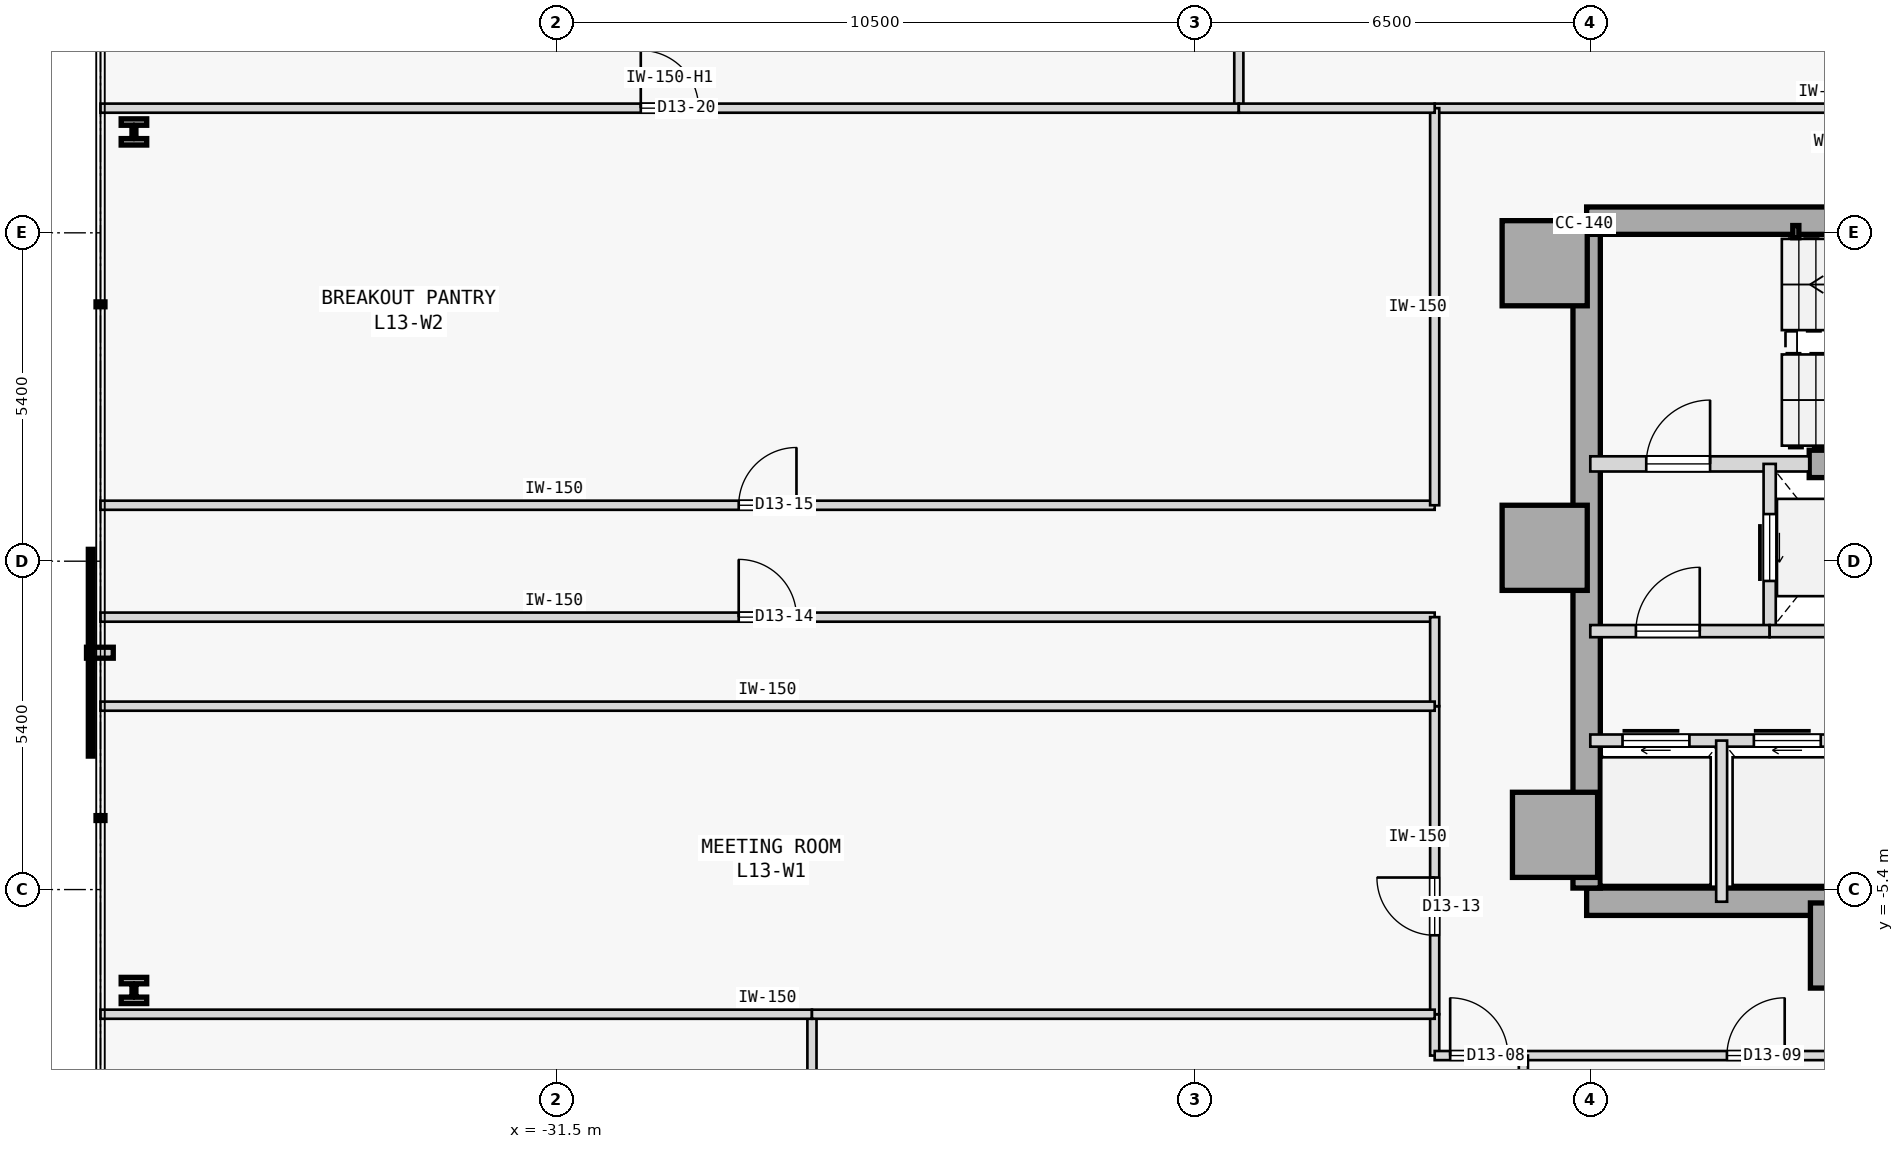
"""IFC4 building model, lengths in metres.
Left out: names, types, materials, properties, quantities, classifications, styles, units other than length and angle.
Written with IfcOpenShell. Run it as: python <this file> out.ifc"""

import sys

from ifc_helpers import new_model, si_unit, direction, frame, frame_2d, origin, origin_2d, place, context, subcontext, project, spatial, rectangle, hollow_rectangle, i_section, extrude, element, fill, save


model = new_model("IFC4")
c1 = context("Model", 3, precision=1e-05, world=origin(), true_north=direction((0.0, 1.0)))
c2 = subcontext(c1, "Body", "Model", "MODEL_VIEW")
j1 = project(units=[si_unit("LENGTHUNIT", "METRE"), si_unit("PLANEANGLEUNIT", "RADIAN")], contexts=[c1])
p1 = place(None, origin())
s1 = spatial("IfcSite", under=j1, at=p1, CompositionType="ELEMENT")
p2 = place(p1, origin())
s2 = spatial("IfcBuilding", under=s1, at=p2, CompositionType="ELEMENT")
p3 = place(p2, frame((0.0, 0.0, 56.0)))
s3 = spatial("IfcBuildingStorey", under=s2, at=p3, CompositionType="ELEMENT", Elevation=56.0)
for number, where, z_axis, x_axis in (
    (1, (-15.25, 4.9, 0.0), (0.0, 0.0, 1.0), (1.0, 0.0, 0.0)),
    (2, (-15.25, 0.22, 0.0), (0.0, 0.0, 1.0), (1.0, 0.0, 0.0)),
    (3, (-15.08, -4.5, 0.0), (0.0, 0.0, 1.0), (1.0, 0.0, 0.0)),
    (4, (-10.18, -6.32, 0.0), (0.0, 0.0, 1.0), (1.0, 0.0, 0.0)),
):
    element("IfcColumn", number, at=place(p3, frame(where, z_axis=z_axis, x_axis=x_axis)), inside=s3, PredefinedType="COLUMN", context=c2, shape_type="SweptSolid", body=[
        extrude(rectangle(XDim=1.4, YDim=1.4, at=origin_2d()), origin(), (0.0, 0.0, 1.0), 3.8),
    ])
p4 = place(p3, frame((-14.56, 5.6, 0.0), z_axis=(0.0, 0.0, 1.0), x_axis=(1.0, 0.0, 0.0)))
e5 = element("IfcWall", 5, at=p4, inside=s3, PredefinedType="SHEAR", context=c2, shape_type="SweptSolid", body=[
    extrude(rectangle(XDim=11.41, YDim=0.45, at=frame_2d((5.705, 0.0))), origin(), (0.0, 0.0, 1.0), 3.575),
])
p5 = place(p3, frame((-14.56, -5.6, 0.0), z_axis=(0.0, 0.0, 1.0), x_axis=(1.0, 0.0, 0.0)))
e6 = element("IfcWall", 6, at=p5, inside=s3, PredefinedType="SHEAR", context=c2, shape_type="SweptSolid", body=[
    extrude(rectangle(XDim=10.86, YDim=0.45, at=frame_2d((5.43, 0.0))), origin(), (0.0, 0.0, 1.0), 3.575),
])
p6 = place(p3, frame((-14.56, -5.375, 0.0), z_axis=(0.0, 0.0, 1.0), x_axis=(0.0, 1.0, 0.0)))
e7 = element("IfcWall", 7, at=p6, inside=s3, PredefinedType="SHEAR", context=c2, shape_type="SweptSolid", body=[
    extrude(rectangle(XDim=10.75, YDim=0.45, at=frame_2d((5.375, 0.0))), origin(), (0.0, 0.0, 1.0), 3.575),
])
p7 = place(p3, frame((-10.9, 1.6, 0.0), z_axis=(0.0, 0.0, 1.0), x_axis=(1.0, 0.0, 0.0)))
e8 = element("IfcWall", 8, at=p7, inside=s3, PredefinedType="SHEAR", context=c2, shape_type="SweptSolid", body=[
    extrude(rectangle(XDim=5.15, YDim=0.45, at=frame_2d((2.575, 0.0))), origin(), (0.0, 0.0, 1.0), 3.575),
])
p8 = place(p3, frame((-11.12, 5.42, 0.0), z_axis=(0.0, 0.0, 1.0), x_axis=(1.0, 0.0, 0.0)))
e9 = element("IfcColumn", 9, at=p8, inside=s3, PredefinedType="COLUMN", context=c2, shape_type="SweptSolid", body=[
    extrude(hollow_rectangle(XDim=0.1, YDim=0.2, WallThickness=0.008, at=origin_2d()), origin(), (0.0, 0.0, 1.0), 3.8),
])
for number, where, z_axis, x_axis in (
    (10, (-38.45, 7.059, 0.0), (0.0, 0.0, 1.0), (1.0, 0.0, 0.0)),
    (11, (-38.45, -7.059, 0.0), (0.0, 0.0, 1.0), (1.0, 0.0, 0.0)),
):
    element("IfcColumn", number, at=place(p3, frame(where, z_axis=z_axis, x_axis=x_axis)), inside=s3, PredefinedType="COLUMN", context=c2, shape_type="SweptSolid", body=[
        extrude(i_section(OverallWidth=0.42, OverallDepth=0.431, WebThickness=0.065, FlangeThickness=0.106, FilletRadius=0.015, at=origin_2d()), origin(), (0.0, 0.0, 1.0), 3.8),
    ])
p9 = place(p3, frame((-14.5, 1.6, 0.0), z_axis=(0.0, 0.0, 1.0), x_axis=(1.0, 0.0, 0.0)))
e12 = element("IfcWall", 12, at=p9, inside=s3, PredefinedType="STANDARD", context=c2, shape_type="SweptSolid", body=[
    extrude(rectangle(XDim=3.6, YDim=0.25, at=frame_2d((1.8, 0.0))), origin(), (0.0, 0.0, 1.0), 3.575),
])
p10 = place(p9, frame((0.92, 0.0, 0.0)))
e13 = element("IfcOpeningElement", 13, at=p10, cuts=e12, PredefinedType="OPENING", context=c2, shape_type="SweptSolid", body=[
    extrude(rectangle(XDim=1.05, YDim=2.15, at=frame_2d((0.525, 1.075))), frame((0.0, 0.135, 0.0), z_axis=(0.0, -1.0, 0.0), x_axis=(1.0, 0.0, 0.0)), (0.0, 0.0, 1.0), 0.27),
])
p11 = place(p3, frame((-11.55, -1.15, 0.0), z_axis=(0.0, 0.0, 1.0), x_axis=(0.0, 1.0, 0.0)))
e14 = element("IfcWall", 14, at=p11, inside=s3, PredefinedType="STANDARD", context=c2, shape_type="SweptSolid", body=[
    extrude(rectangle(XDim=2.75, YDim=0.2, at=frame_2d((1.375, 0.0))), origin(), (0.0, 0.0, 1.0), 3.575),
])
p12 = place(p11, frame((0.825, 0.0, 0.0)))
e15 = element("IfcOpeningElement", 15, at=p12, cuts=e14, PredefinedType="OPENING", context=c2, shape_type="SweptSolid", body=[
    extrude(rectangle(XDim=1.1, YDim=2.15, at=frame_2d((0.55, 1.075))), frame((0.0, 0.11, 0.0), z_axis=(0.0, -1.0, 0.0), x_axis=(1.0, 0.0, 0.0)), (0.0, 0.0, 1.0), 0.22),
])
p13 = place(p3, frame((-14.5, -1.15, 0.0), z_axis=(0.0, 0.0, 1.0), x_axis=(1.0, 0.0, 0.0)))
e16 = element("IfcWall", 16, at=p13, inside=s3, PredefinedType="STANDARD", context=c2, shape_type="SweptSolid", body=[
    extrude(rectangle(XDim=2.95, YDim=0.2, at=frame_2d((1.475, 0.0))), origin(), (0.0, 0.0, 1.0), 3.575),
])
p14 = place(p13, frame((0.75, 0.0, 0.0)))
e17 = element("IfcOpeningElement", 17, at=p14, cuts=e16, PredefinedType="OPENING", context=c2, shape_type="SweptSolid", body=[
    extrude(rectangle(XDim=1.05, YDim=2.18, at=frame_2d((0.525, 1.09))), frame((0.0, 0.11, 0.0), z_axis=(0.0, -1.0, 0.0), x_axis=(1.0, 0.0, 0.0)), (0.0, 0.0, 1.0), 0.22),
])
p15 = place(p3, frame((-11.55, -1.15, 0.0), z_axis=(0.0, 0.0, 1.0), x_axis=(1.0, 0.0, 0.0)))
e18 = element("IfcWall", 18, at=p15, inside=s3, PredefinedType="STANDARD", context=c2, shape_type="SweptSolid", body=[
    extrude(rectangle(XDim=2.2, YDim=0.2, at=frame_2d((1.1, 0.0))), origin(), (0.0, 0.0, 1.0), 3.575),
])
p16 = place(p3, frame((-14.5, -2.95, 0.0), z_axis=(0.0, 0.0, 1.0), x_axis=(1.0, 0.0, 0.0)))
e19 = element("IfcWall", 19, at=p16, inside=s3, PredefinedType="STANDARD", context=c2, shape_type="SweptSolid", body=[
    extrude(rectangle(XDim=10.8, YDim=0.2, at=frame_2d((5.4, 0.0))), origin(), (0.0, 0.0, 1.0), 3.575),
])
p17 = place(p16, frame((0.53, 0.0, 0.0)))
e20 = element("IfcOpeningElement", 20, at=p17, cuts=e19, PredefinedType="OPENING", context=c2, shape_type="SweptSolid", body=[
    extrude(rectangle(XDim=1.1, YDim=2.15, at=frame_2d((0.55, 1.075))), frame((0.0, 0.11, 0.0), z_axis=(0.0, -1.0, 0.0), x_axis=(1.0, 0.0, 0.0)), (0.0, 0.0, 1.0), 0.22),
])
p18 = place(p16, frame((2.69, 0.0, 0.0)))
e21 = element("IfcOpeningElement", 21, at=p18, cuts=e19, PredefinedType="OPENING", context=c2, shape_type="SweptSolid", body=[
    extrude(rectangle(XDim=1.1, YDim=2.15, at=frame_2d((0.55, 1.075))), frame((0.0, 0.11, 0.0), z_axis=(0.0, -1.0, 0.0), x_axis=(1.0, 0.0, 0.0)), (0.0, 0.0, 1.0), 0.22),
])
p19 = place(p3, frame((-12.34, -5.6, 0.0), z_axis=(0.0, 0.0, 1.0), x_axis=(0.0, 1.0, 0.0)))
e22 = element("IfcWall", 22, at=p19, inside=s3, PredefinedType="STANDARD", context=c2, shape_type="SweptSolid", body=[
    extrude(rectangle(XDim=2.65, YDim=0.18, at=frame_2d((1.325, 0.0))), origin(), (0.0, 0.0, 1.0), 3.575),
])
p20 = place(p3, frame((-17.059, 7.45, 0.0), z_axis=(0.0, 0.0, 1.0), x_axis=(1.0, 0.0, 0.0)))
e23 = element("IfcWall", 23, at=p20, inside=s3, PredefinedType="PARTITIONING", context=c2, shape_type="SweptSolid", body=[
    extrude(rectangle(XDim=16.139, YDim=0.15, at=frame_2d((8.07, 0.0))), origin(), (0.0, 0.0, 1.0), 3.575),
])
p21 = place(p3, frame((-17.059, -8.13, 0.0), z_axis=(0.0, 0.0, 1.0), x_axis=(0.0, 1.0, 0.0)))
e24 = element("IfcWall", 24, at=p21, inside=s3, PredefinedType="PARTITIONING", context=c2, shape_type="SweptSolid", body=[
    extrude(rectangle(XDim=0.68, YDim=0.15, at=frame_2d((0.34, 0.0))), origin(), (0.0, 0.0, 1.0), 3.575),
])
p22 = place(p3, frame((-17.059, -8.13, 0.0), z_axis=(0.0, 0.0, 1.0), x_axis=(1.0, 0.0, 0.0)))
e25 = element("IfcWall", 25, at=p22, inside=s3, PredefinedType="PARTITIONING", context=c2, shape_type="SweptSolid", body=[
    extrude(rectangle(XDim=1.459, YDim=0.15, at=frame_2d((0.729, 0.0))), origin(), (0.0, 0.0, 1.0), 3.575),
])
p23 = place(p22, frame((0.254, 0.0, 0.0)))
e26 = element("IfcOpeningElement", 26, at=p23, cuts=e25, PredefinedType="OPENING", context=c2, shape_type="SweptSolid", body=[
    extrude(rectangle(XDim=0.95, YDim=2.15, at=frame_2d((0.475, 1.075))), frame((0.0, 0.085, 0.0), z_axis=(0.0, -1.0, 0.0), x_axis=(1.0, 0.0, 0.0)), (0.0, 0.0, 1.0), 0.17),
])
p24 = place(p3, frame((-15.6, -8.13, 0.0), z_axis=(0.0, 0.0, 1.0), x_axis=(1.0, 0.0, 0.0)))
e27 = element("IfcWall", 27, at=p24, inside=s3, PredefinedType="PARTITIONING", context=c2, shape_type="SweptSolid", body=[
    extrude(rectangle(XDim=10.92, YDim=0.15, at=frame_2d((5.46, 0.0))), origin(), (0.0, 0.0, 1.0), 3.575),
])
p25 = place(p24, frame((3.347, 0.0, 0.0)))
e28 = element("IfcOpeningElement", 28, at=p25, cuts=e27, PredefinedType="OPENING", context=c2, shape_type="SweptSolid", body=[
    extrude(rectangle(XDim=0.95, YDim=2.15, at=frame_2d((0.475, 1.075))), frame((0.0, 0.085, 0.0), z_axis=(0.0, -1.0, 0.0), x_axis=(1.0, 0.0, 0.0)), (0.0, 0.0, 1.0), 0.17),
])
p26 = place(p3, frame((-17.059, -7.45, 0.0), z_axis=(0.0, 0.0, 1.0), x_axis=(0.0, 1.0, 0.0)))
e29 = element("IfcWall", 29, at=p26, inside=s3, PredefinedType="PARTITIONING", context=c2, shape_type="SweptSolid", body=[
    extrude(rectangle(XDim=5.066, YDim=0.15, at=frame_2d((2.533, 0.0))), origin(), (0.0, 0.0, 1.0), 3.575),
])
p27 = place(p26, frame((1.298, 0.0, 0.0)))
e30 = element("IfcOpeningElement", 30, at=p27, cuts=e29, PredefinedType="OPENING", context=c2, shape_type="SweptSolid", body=[
    extrude(rectangle(XDim=0.95, YDim=2.15, at=frame_2d((0.475, 1.075))), frame((0.0, 0.085, 0.0), z_axis=(0.0, -1.0, 0.0), x_axis=(1.0, 0.0, 0.0)), (0.0, 0.0, 1.0), 0.17),
])
p28 = place(p3, frame((-39.0, -0.92, 0.0), z_axis=(0.0, 0.0, 1.0), x_axis=(1.0, 0.0, 0.0)))
e31 = element("IfcWall", 31, at=p28, inside=s3, PredefinedType="PARTITIONING", context=c2, shape_type="SweptSolid", body=[
    extrude(rectangle(XDim=21.941, YDim=0.15, at=frame_2d((10.97, 0.0))), origin(), (0.0, 0.0, 1.0), 3.575),
])
p29 = place(p28, frame((10.496, 0.0, 0.0)))
e32 = element("IfcOpeningElement", 32, at=p29, cuts=e31, PredefinedType="OPENING", context=c2, shape_type="SweptSolid", body=[
    extrude(rectangle(XDim=0.95, YDim=2.15, at=frame_2d((0.475, 1.075))), frame((0.0, 0.085, 0.0), z_axis=(0.0, -1.0, 0.0), x_axis=(1.0, 0.0, 0.0)), (0.0, 0.0, 1.0), 0.17),
])
p30 = place(p3, frame((-17.059, -2.384, 0.0), z_axis=(0.0, 0.0, 1.0), x_axis=(0.0, 1.0, 0.0)))
e33 = element("IfcWall", 33, at=p30, inside=s3, PredefinedType="PARTITIONING", context=c2, shape_type="SweptSolid", body=[
    extrude(rectangle(XDim=1.464, YDim=0.15, at=frame_2d((0.732, 0.0))), origin(), (0.0, 0.0, 1.0), 3.575),
])
p31 = place(p3, frame((-39.0, 0.92, 0.0), z_axis=(0.0, 0.0, 1.0), x_axis=(1.0, 0.0, 0.0)))
e34 = element("IfcWall", 34, at=p31, inside=s3, PredefinedType="PARTITIONING", context=c2, shape_type="SweptSolid", body=[
    extrude(rectangle(XDim=21.941, YDim=0.15, at=frame_2d((10.97, 0.0))), origin(), (0.0, 0.0, 1.0), 3.575),
])
p32 = place(p31, frame((10.496, 0.0, 0.0)))
e35 = element("IfcOpeningElement", 35, at=p32, cuts=e34, PredefinedType="OPENING", context=c2, shape_type="SweptSolid", body=[
    extrude(rectangle(XDim=0.95, YDim=2.15, at=frame_2d((0.475, 1.075))), frame((0.0, 0.085, 0.0), z_axis=(0.0, -1.0, 0.0), x_axis=(1.0, 0.0, 0.0)), (0.0, 0.0, 1.0), 0.17),
])
p33 = place(p3, frame((-17.059, 0.92, 0.0), z_axis=(0.0, 0.0, 1.0), x_axis=(0.0, 1.0, 0.0)))
e36 = element("IfcWall", 36, at=p33, inside=s3, PredefinedType="PARTITIONING", context=c2, shape_type="SweptSolid", body=[
    extrude(rectangle(XDim=6.53, YDim=0.15, at=frame_2d((3.265, 0.0))), origin(), (0.0, 0.0, 1.0), 3.575),
])
p34 = place(p3, frame((-20.28, 7.45, 0.0), z_axis=(0.0, 0.0, 1.0), x_axis=(0.0, 1.0, 0.0)))
e37 = element("IfcWall", 37, at=p34, inside=s3, PredefinedType="PARTITIONING", context=c2, shape_type="SweptSolid", body=[
    extrude(rectangle(XDim=17.55, YDim=0.15, at=frame_2d((8.775, 0.0))), origin(), (0.0, 0.0, 1.0), 3.575),
])
p35 = place(p3, frame((-39.0, 7.45, 0.0), z_axis=(0.0, 0.0, 1.0), x_axis=(1.0, 0.0, 0.0)))
e38 = element("IfcWall", 38, at=p35, inside=s3, PredefinedType="PARTITIONING", context=c2, shape_type="SweptSolid", body=[
    extrude(rectangle(XDim=18.72, YDim=0.15, at=frame_2d((9.36, 0.0))), origin(), (0.0, 0.0, 1.0), 3.125),
])
p36 = place(p35, frame((8.885, 0.0, 0.0)))
e39 = element("IfcOpeningElement", 39, at=p36, cuts=e38, PredefinedType="OPENING", context=c2, shape_type="SweptSolid", body=[
    extrude(rectangle(XDim=0.95, YDim=2.15, at=frame_2d((0.475, 1.075))), frame((0.0, 0.085, 0.0), z_axis=(0.0, -1.0, 0.0), x_axis=(1.0, 0.0, 0.0)), (0.0, 0.0, 1.0), 0.17),
])
p37 = place(p3, frame((-20.28, 7.45, 0.0), z_axis=(0.0, 0.0, 1.0), x_axis=(1.0, 0.0, 0.0)))
e40 = element("IfcWall", 40, at=p37, inside=s3, PredefinedType="PARTITIONING", context=c2, shape_type="SweptSolid", body=[
    extrude(rectangle(XDim=3.221, YDim=0.15, at=frame_2d((1.61, 0.0))), origin(), (0.0, 0.0, 1.0), 3.575),
])
p38 = place(p3, frame((-27.3, -25.0, 0.0), z_axis=(0.0, 0.0, 1.0), x_axis=(0.0, 1.0, 0.0)))
e41 = element("IfcWall", 41, at=p38, inside=s3, PredefinedType="PARTITIONING", context=c2, shape_type="SweptSolid", body=[
    extrude(rectangle(XDim=17.55, YDim=0.15, at=frame_2d((8.775, 0.0))), origin(), (0.0, 0.0, 1.0), 3.575),
])
p39 = place(p38, frame((8.3, 0.0, 0.0)))
e42 = element("IfcOpeningElement", 42, at=p39, cuts=e41, PredefinedType="OPENING", context=c2, shape_type="SweptSolid", body=[
    extrude(rectangle(XDim=0.95, YDim=2.15, at=frame_2d((0.475, 1.075))), frame((0.0, 0.085, 0.0), z_axis=(0.0, -1.0, 0.0), x_axis=(1.0, 0.0, 0.0)), (0.0, 0.0, 1.0), 0.17),
])
p40 = place(p3, frame((-39.0, -7.45, 0.0), z_axis=(0.0, 0.0, 1.0), x_axis=(1.0, 0.0, 0.0)))
e43 = element("IfcWall", 43, at=p40, inside=s3, PredefinedType="PARTITIONING", context=c2, shape_type="SweptSolid", body=[
    extrude(rectangle(XDim=11.7, YDim=0.15, at=frame_2d((5.85, 0.0))), origin(), (0.0, 0.0, 1.0), 3.575),
])
p41 = place(p3, frame((-15.6, -25.0, 0.0), z_axis=(0.0, 0.0, 1.0), x_axis=(0.0, 1.0, 0.0)))
e44 = element("IfcWall", 44, at=p41, inside=s3, PredefinedType="PARTITIONING", context=c2, shape_type="SweptSolid", body=[
    extrude(rectangle(XDim=16.87, YDim=0.15, at=frame_2d((8.435, 0.0))), origin(), (0.0, 0.0, 1.0), 3.575),
])
p42 = place(p3, frame((-27.3, -7.45, 0.0), z_axis=(0.0, 0.0, 1.0), x_axis=(1.0, 0.0, 0.0)))
e45 = element("IfcWall", 45, at=p42, inside=s3, PredefinedType="PARTITIONING", context=c2, shape_type="SweptSolid", body=[
    extrude(rectangle(XDim=10.241, YDim=0.15, at=frame_2d((5.121, 0.0))), origin(), (0.0, 0.0, 1.0), 3.575),
])
p43 = place(p3, frame((-39.0, -2.384, 0.0), z_axis=(0.0, 0.0, 1.0), x_axis=(1.0, 0.0, 0.0)))
e46 = element("IfcWall", 46, at=p43, inside=s3, PredefinedType="PARTITIONING", context=c2, shape_type="SweptSolid", body=[
    extrude(rectangle(XDim=21.941, YDim=0.15, at=frame_2d((10.97, 0.0))), origin(), (0.0, 0.0, 1.0), 3.575),
])
p44 = place(p10, origin())
e47 = element("IfcDoor", 47, at=p44, inside=s3, OperationType="SINGLE_SWING_RIGHT", PredefinedType="DOOR", context=c2, shape_type="SweptSolid", body=[
    extrude(rectangle(XDim=1.05, YDim=2.15, at=frame_2d((0.525, 1.075))), frame((0.0, 0.025, 0.0), z_axis=(0.0, -1.0, 0.0), x_axis=(1.0, 0.0, 0.0)), (0.0, 0.0, 1.0), 0.05),
])
fill(e13, e47)
p45 = place(p14, origin())
e48 = element("IfcDoor", 48, at=p45, inside=s3, OperationType="SINGLE_SWING_RIGHT", PredefinedType="DOOR", context=c2, shape_type="SweptSolid", body=[
    extrude(rectangle(XDim=1.05, YDim=2.18, at=frame_2d((0.525, 1.09))), frame((0.0, 0.025, 0.0), z_axis=(0.0, -1.0, 0.0), x_axis=(1.0, 0.0, 0.0)), (0.0, 0.0, 1.0), 0.05),
])
fill(e17, e48)
p46 = place(p12, origin())
e49 = element("IfcDoor", 49, at=p46, inside=s3, OperationType="SLIDING_TO_RIGHT", PredefinedType="DOOR", context=c2, shape_type="SweptSolid", body=[
    extrude(rectangle(XDim=1.1, YDim=2.15, at=frame_2d((0.55, 1.075))), frame((0.0, 0.025, 0.0), z_axis=(0.0, -1.0, 0.0), x_axis=(1.0, 0.0, 0.0)), (0.0, 0.0, 1.0), 0.05),
])
fill(e15, e49)
p47 = place(p17, origin())
e50 = element("IfcDoor", 50, at=p47, inside=s3, OperationType="SLIDING_TO_RIGHT", PredefinedType="DOOR", context=c2, shape_type="SweptSolid", body=[
    extrude(rectangle(XDim=1.1, YDim=2.15, at=frame_2d((0.55, 1.075))), frame((0.0, 0.025, 0.0), z_axis=(0.0, -1.0, 0.0), x_axis=(1.0, 0.0, 0.0)), (0.0, 0.0, 1.0), 0.05),
])
fill(e20, e50)
p48 = place(p18, origin())
e51 = element("IfcDoor", 51, at=p48, inside=s3, OperationType="SLIDING_TO_RIGHT", PredefinedType="DOOR", context=c2, shape_type="SweptSolid", body=[
    extrude(rectangle(XDim=1.1, YDim=2.15, at=frame_2d((0.55, 1.075))), frame((0.0, 0.025, 0.0), z_axis=(0.0, -1.0, 0.0), x_axis=(1.0, 0.0, 0.0)), (0.0, 0.0, 1.0), 0.05),
])
fill(e21, e51)
p49 = place(p23, origin())
e52 = element("IfcDoor", 52, at=p49, inside=s3, OperationType="SINGLE_SWING_LEFT", PredefinedType="DOOR", context=c2, shape_type="SweptSolid", body=[
    extrude(rectangle(XDim=0.95, YDim=2.15, at=frame_2d((0.475, 1.075))), frame((0.0, 0.025, 0.0), z_axis=(0.0, -1.0, 0.0), x_axis=(1.0, 0.0, 0.0)), (0.0, 0.0, 1.0), 0.05),
])
fill(e26, e52)
p50 = place(p25, origin())
e53 = element("IfcDoor", 53, at=p50, inside=s3, OperationType="SINGLE_SWING_RIGHT", PredefinedType="DOOR", context=c2, shape_type="SweptSolid", body=[
    extrude(rectangle(XDim=0.95, YDim=2.15, at=frame_2d((0.475, 1.075))), frame((0.0, 0.025, 0.0), z_axis=(0.0, -1.0, 0.0), x_axis=(1.0, 0.0, 0.0)), (0.0, 0.0, 1.0), 0.05),
])
fill(e28, e53)
p51 = place(p27, origin())
e54 = element("IfcDoor", 54, at=p51, inside=s3, OperationType="SINGLE_SWING_RIGHT", PredefinedType="DOOR", context=c2, shape_type="SweptSolid", body=[
    extrude(rectangle(XDim=0.95, YDim=2.15, at=frame_2d((0.475, 1.075))), frame((0.0, 0.025, 0.0), z_axis=(0.0, -1.0, 0.0), x_axis=(1.0, 0.0, 0.0)), (0.0, 0.0, 1.0), 0.05),
])
fill(e30, e54)
p52 = place(p29, origin())
e55 = element("IfcDoor", 55, at=p52, inside=s3, OperationType="SINGLE_SWING_LEFT", PredefinedType="DOOR", context=c2, shape_type="SweptSolid", body=[
    extrude(rectangle(XDim=0.95, YDim=2.15, at=frame_2d((0.475, 1.075))), frame((0.0, 0.025, 0.0), z_axis=(0.0, -1.0, 0.0), x_axis=(1.0, 0.0, 0.0)), (0.0, 0.0, 1.0), 0.05),
])
fill(e32, e55)
p53 = place(p32, origin())
e56 = element("IfcDoor", 56, at=p53, inside=s3, OperationType="SINGLE_SWING_RIGHT", PredefinedType="DOOR", context=c2, shape_type="SweptSolid", body=[
    extrude(rectangle(XDim=0.95, YDim=2.15, at=frame_2d((0.475, 1.075))), frame((0.0, 0.025, 0.0), z_axis=(0.0, -1.0, 0.0), x_axis=(1.0, 0.0, 0.0)), (0.0, 0.0, 1.0), 0.05),
])
fill(e35, e56)
p54 = place(p36, origin())
e57 = element("IfcDoor", 57, at=p54, inside=s3, OperationType="SINGLE_SWING_LEFT", PredefinedType="DOOR", context=c2, shape_type="SweptSolid", body=[
    extrude(rectangle(XDim=0.95, YDim=2.15, at=frame_2d((0.475, 1.075))), frame((0.0, 0.025, 0.0), z_axis=(0.0, -1.0, 0.0), x_axis=(1.0, 0.0, 0.0)), (0.0, 0.0, 1.0), 0.05),
])
fill(e39, e57)
save(model, sys.argv[1])
